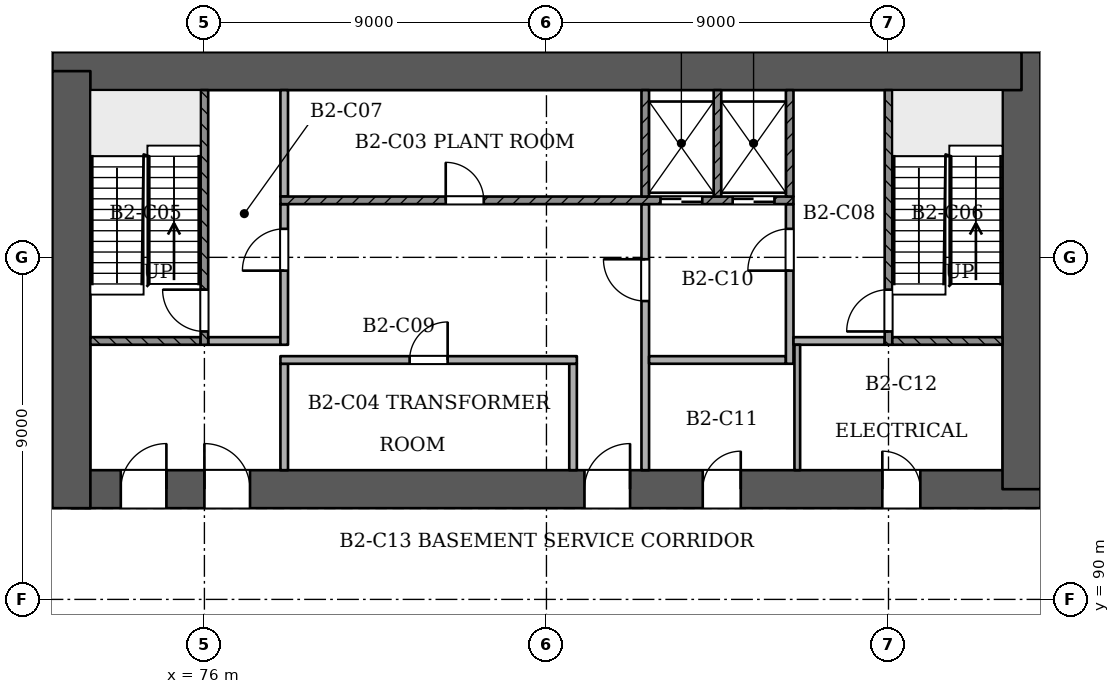
"""IFC4 building model, lengths in metres.
Left out: names, types, materials, properties, quantities, classifications, styles, units other than length and angle.
Written with IfcOpenShell. Run it as: python <this file> out.ifc"""

import sys

from ifc_helpers import new_model, si_unit, direction, frame, frame_2d, origin, place, context, subcontext, project, spatial, rectangle, extrude, element, fill, save


model = new_model("IFC4")
c1 = context("Model", 3, precision=1e-05, world=origin(), true_north=direction((0.0, 1.0)))
c2 = subcontext(c1, "Body", "Model", "MODEL_VIEW")
j1 = project(units=[si_unit("LENGTHUNIT", "METRE"), si_unit("PLANEANGLEUNIT", "RADIAN")], contexts=[c1])
p1 = place(None, origin())
s1 = spatial("IfcSite", under=j1, at=p1, CompositionType="ELEMENT")
p2 = place(p1, origin())
s2 = spatial("IfcBuilding", under=s1, at=p2, CompositionType="ELEMENT")
p3 = place(p2, frame((0.0, 0.0, -9.0)))
s3 = spatial("IfcBuildingStorey", under=s2, at=p3, CompositionType="ELEMENT", Elevation=-9.0)
p4 = place(p3, frame((48.411, 95.474, -0.3), z_axis=(0.0, 0.0, 1.0), x_axis=(0.500000424729, -0.866025158567, 0.0)))
e1 = element("IfcWall", 1, at=p4, inside=s3, PredefinedType="SOLIDWALL", context=c2, shape_type="SweptSolid", body=[
    extrude(rectangle(XDim=62.697, YDim=0.6, at=frame_2d((31.349, 0.0))), origin(), (0.0, 0.0, 1.0), 4.8),
])
p5 = place(p3, frame((90.327, 41.326, -0.3), z_axis=(0.0, 0.0, 1.0), x_axis=(0.499998738597, 0.866026132054, 0.0)))
e2 = element("IfcWall", 2, at=p5, inside=s3, PredefinedType="SOLIDWALL", context=c2, shape_type="SweptSolid", body=[
    extrude(rectangle(XDim=62.698, YDim=0.6, at=frame_2d((31.349, 0.0))), origin(), (0.0, 0.0, 1.0), 4.8),
])
p6 = place(p3, frame((72.5, 92.9, -0.3), z_axis=(0.0, 0.0, 1.0), x_axis=(1.0, 0.0, 0.0)))
e3 = element("IfcWall", 3, at=p6, inside=s3, PredefinedType="SHEAR", context=c2, shape_type="SweptSolid", body=[
    extrude(rectangle(XDim=25.5, YDim=1.0, at=frame_2d((12.75, 0.0))), origin(), (0.0, 0.0, 1.0), 4.8),
])
p7 = place(p6, frame((1.3, 0.0, 0.3)))
e4 = element("IfcOpeningElement", 4, at=p7, cuts=e3, PredefinedType="OPENING", context=c2, shape_type="SweptSolid", body=[
    extrude(rectangle(XDim=1.2, YDim=2.1, at=frame_2d((0.6, 1.05))), frame((0.0, 0.51, 0.0), z_axis=(0.0, -1.0, 0.0), x_axis=(1.0, 0.0, 0.0)), (0.0, 0.0, 1.0), 1.021),
])
p8 = place(p6, frame((3.5, 0.0, 0.3)))
e5 = element("IfcOpeningElement", 5, at=p8, cuts=e3, PredefinedType="OPENING", context=c2, shape_type="SweptSolid", body=[
    extrude(rectangle(XDim=1.2, YDim=2.1, at=frame_2d((0.6, 1.05))), frame((0.0, 0.51, 0.0), z_axis=(0.0, -1.0, 0.0), x_axis=(1.0, 0.0, 0.0)), (0.0, 0.0, 1.0), 1.021),
])
p9 = place(p6, frame((13.5, 0.0, 0.3)))
e6 = element("IfcOpeningElement", 6, at=p9, cuts=e3, PredefinedType="OPENING", context=c2, shape_type="SweptSolid", body=[
    extrude(rectangle(XDim=1.2, YDim=2.1, at=frame_2d((0.6, 1.05))), frame((0.0, 0.51, 0.0), z_axis=(0.0, -1.0, 0.0), x_axis=(1.0, 0.0, 0.0)), (0.0, 0.0, 1.0), 1.021),
])
p10 = place(p6, frame((16.613, 0.0, 0.3)))
e7 = element("IfcOpeningElement", 7, at=p10, cuts=e3, PredefinedType="OPENING", context=c2, shape_type="SweptSolid", body=[
    extrude(rectangle(XDim=1.0, YDim=2.1, at=frame_2d((0.5, 1.05))), frame((0.0, 0.51, 0.0), z_axis=(0.0, -1.0, 0.0), x_axis=(1.0, 0.0, 0.0)), (0.0, 0.0, 1.0), 1.021),
])
p11 = place(p6, frame((21.337, 0.0, 0.3)))
e8 = element("IfcOpeningElement", 8, at=p11, cuts=e3, PredefinedType="OPENING", context=c2, shape_type="SweptSolid", body=[
    extrude(rectangle(XDim=1.0, YDim=2.1, at=frame_2d((0.5, 1.05))), frame((0.0, 0.51, 0.0), z_axis=(0.0, -1.0, 0.0), x_axis=(1.0, 0.0, 0.0)), (0.0, 0.0, 1.0), 1.021),
])
p12 = place(p3, frame((97.5, 92.9, -0.3), z_axis=(0.0, 0.0, 1.0), x_axis=(0.0, 1.0, 0.0)))
e9 = element("IfcWall", 9, at=p12, inside=s3, PredefinedType="SHEAR", context=c2, shape_type="SweptSolid", body=[
    extrude(rectangle(XDim=11.5, YDim=1.0, at=frame_2d((5.75, 0.0))), origin(), (0.0, 0.0, 1.0), 4.8),
])
p13 = place(p3, frame((97.5, 103.9, -0.3), z_axis=(0.0, 0.0, 1.0), x_axis=(-1.0, 0.0, 0.0)))
e10 = element("IfcWall", 10, at=p13, inside=s3, PredefinedType="SHEAR", context=c2, shape_type="SweptSolid", body=[
    extrude(rectangle(XDim=25.5, YDim=1.0, at=frame_2d((12.75, 0.0))), origin(), (0.0, 0.0, 1.0), 4.8),
])
p14 = place(p3, frame((72.5, 103.9, -0.3), z_axis=(0.0, 0.0, 1.0), x_axis=(0.0, -1.0, 0.0)))
e11 = element("IfcWall", 11, at=p14, inside=s3, PredefinedType="SHEAR", context=c2, shape_type="SweptSolid", body=[
    extrude(rectangle(XDim=11.5, YDim=1.0, at=frame_2d((5.75, 0.0))), origin(), (0.0, 0.0, 1.0), 4.8),
])
for number, where, z_axis, x_axis in (
    (12, (78.1, 93.4, 0.0), (0.0, 0.0, 1.0), (0.0, 1.0, 0.0)),
    (13, (85.7, 93.4, 0.0), (0.0, 0.0, 1.0), (0.0, 1.0, 0.0)),
):
    element("IfcWall", number, at=place(p3, frame(where, z_axis=z_axis, x_axis=x_axis)), inside=s3, PredefinedType="PARTITIONING", context=c2, shape_type="SweptSolid", body=[
        extrude(rectangle(XDim=2.8, YDim=0.2, at=frame_2d((1.4, 0.0))), origin(), (0.0, 0.0, 1.0), 4.2),
    ])
p15 = place(p3, frame((87.6, 93.4, 0.0), z_axis=(0.0, 0.0, 1.0), x_axis=(0.0, 1.0, 0.0)))
e14 = element("IfcWall", 14, at=p15, inside=s3, PredefinedType="PARTITIONING", context=c2, shape_type="SweptSolid", body=[
    extrude(rectangle(XDim=7.0, YDim=0.2, at=frame_2d((3.5, 0.0))), origin(), (0.0, 0.0, 1.0), 4.2),
])
p16 = place(p15, frame((4.45, 0.0, 0.0)))
e15 = element("IfcOpeningElement", 15, at=p16, cuts=e14, PredefinedType="OPENING", context=c2, shape_type="SweptSolid", body=[
    extrude(rectangle(XDim=1.1, YDim=2.1, at=frame_2d((0.55, 1.05))), frame((0.0, 0.11, 0.0), z_axis=(0.0, -1.0, 0.0), x_axis=(1.0, 0.0, 0.0)), (0.0, 0.0, 1.0), 0.221),
])
p17 = place(p3, frame((91.6, 93.4, 0.0), z_axis=(0.0, 0.0, 1.0), x_axis=(0.0, 1.0, 0.0)))
e16 = element("IfcWall", 16, at=p17, inside=s3, PredefinedType="PARTITIONING", context=c2, shape_type="SweptSolid", body=[
    extrude(rectangle(XDim=3.3, YDim=0.15, at=frame_2d((1.65, 0.0))), origin(), (0.0, 0.0, 1.0), 4.2),
])
p18 = place(p3, frame((78.0, 96.3, 0.0), z_axis=(0.0, 0.0, 1.0), x_axis=(1.0, 0.0, 0.0)))
e17 = element("IfcWall", 17, at=p18, inside=s3, PredefinedType="PARTITIONING", context=c2, shape_type="SweptSolid", body=[
    extrude(rectangle(XDim=7.8, YDim=0.2, at=frame_2d((3.9, 0.0))), origin(), (0.0, 0.0, 1.0), 4.2),
])
p19 = place(p18, frame((3.4, 0.0, 0.0)))
e18 = element("IfcOpeningElement", 18, at=p19, cuts=e17, PredefinedType="OPENING", context=c2, shape_type="SweptSolid", body=[
    extrude(rectangle(XDim=1.0, YDim=2.1, at=frame_2d((0.5, 1.05))), frame((0.0, 0.11, 0.0), z_axis=(0.0, -1.0, 0.0), x_axis=(1.0, 0.0, 0.0)), (0.0, 0.0, 1.0), 0.221),
])
p20 = place(p3, frame((87.7, 96.3, 0.0), z_axis=(0.0, 0.0, 1.0), x_axis=(1.0, 0.0, 0.0)))
e19 = element("IfcWall", 19, at=p20, inside=s3, PredefinedType="PARTITIONING", context=c2, shape_type="SweptSolid", body=[
    extrude(rectangle(XDim=3.6, YDim=0.2, at=frame_2d((1.8, 0.0))), origin(), (0.0, 0.0, 1.0), 4.2),
])
p21 = place(p3, frame((91.4, 96.2, 0.0), z_axis=(0.0, 0.0, 1.0), x_axis=(0.0, 1.0, 0.0)))
e20 = element("IfcWall", 20, at=p21, inside=s3, PredefinedType="PARTITIONING", context=c2, shape_type="SweptSolid", body=[
    extrude(rectangle(XDim=4.2, YDim=0.2, at=frame_2d((2.1, 0.0))), origin(), (0.0, 0.0, 1.0), 4.2),
])
p22 = place(p21, frame((2.45, 0.0, 0.0)))
e21 = element("IfcOpeningElement", 21, at=p22, cuts=e20, PredefinedType="OPENING", context=c2, shape_type="SweptSolid", body=[
    extrude(rectangle(XDim=1.1, YDim=2.1, at=frame_2d((0.55, 1.05))), frame((0.0, 0.11, 0.0), z_axis=(0.0, -1.0, 0.0), x_axis=(1.0, 0.0, 0.0)), (0.0, 0.0, 1.0), 0.221),
])
p23 = place(p3, frame((73.0, 96.8, 0.0), z_axis=(0.0, 0.0, 1.0), x_axis=(1.0, 0.0, 0.0)))
e22 = element("IfcWall", 22, at=p23, inside=s3, PredefinedType="SOLIDWALL", context=c2, shape_type="SweptSolid", body=[
    extrude(rectangle(XDim=2.9, YDim=0.2, at=frame_2d((1.45, 0.0))), origin(), (0.0, 0.0, 1.0), 4.2),
])
p24 = place(p3, frame((76.0, 96.7, 0.0), z_axis=(0.0, 0.0, 1.0), x_axis=(0.0, 1.0, 0.0)))
e23 = element("IfcWall", 23, at=p24, inside=s3, PredefinedType="SOLIDWALL", context=c2, shape_type="SweptSolid", body=[
    extrude(rectangle(XDim=6.7, YDim=0.2, at=frame_2d((3.35, 0.0))), origin(), (0.0, 0.0, 1.0), 4.2),
])
p25 = place(p24, frame((0.35, 0.0, 0.0)))
e24 = element("IfcOpeningElement", 24, at=p25, cuts=e23, PredefinedType="OPENING", context=c2, shape_type="SweptSolid", body=[
    extrude(rectangle(XDim=1.1, YDim=2.1, at=frame_2d((0.55, 1.05))), frame((0.0, 0.11, 0.0), z_axis=(0.0, -1.0, 0.0), x_axis=(1.0, 0.0, 0.0)), (0.0, 0.0, 1.0), 0.221),
])
p26 = place(p3, frame((76.1, 96.8, 0.0), z_axis=(0.0, 0.0, 1.0), x_axis=(1.0, 0.0, 0.0)))
e25 = element("IfcWall", 25, at=p26, inside=s3, PredefinedType="PARTITIONING", context=c2, shape_type="SweptSolid", body=[
    extrude(rectangle(XDim=1.9, YDim=0.2, at=frame_2d((0.95, 0.0))), origin(), (0.0, 0.0, 1.0), 4.2),
])
p27 = place(p3, frame((78.1, 96.7, 0.0), z_axis=(0.0, 0.0, 1.0), x_axis=(0.0, 1.0, 0.0)))
e26 = element("IfcWall", 26, at=p27, inside=s3, PredefinedType="PARTITIONING", context=c2, shape_type="SweptSolid", body=[
    extrude(rectangle(XDim=3.7, YDim=0.2, at=frame_2d((1.85, 0.0))), origin(), (0.0, 0.0, 1.0), 4.2),
])
p28 = place(p27, frame((1.95, 0.0, 0.0)))
e27 = element("IfcOpeningElement", 27, at=p28, cuts=e26, PredefinedType="OPENING", context=c2, shape_type="SweptSolid", body=[
    extrude(rectangle(XDim=1.1, YDim=2.1, at=frame_2d((0.55, 1.05))), frame((0.0, 0.11, 0.0), z_axis=(0.0, -1.0, 0.0), x_axis=(1.0, 0.0, 0.0)), (0.0, 0.0, 1.0), 0.221),
])
p29 = place(p3, frame((91.5, 96.8, 0.0), z_axis=(0.0, 0.0, 1.0), x_axis=(1.0, 0.0, 0.0)))
e28 = element("IfcWall", 28, at=p29, inside=s3, PredefinedType="PARTITIONING", context=c2, shape_type="SweptSolid", body=[
    extrude(rectangle(XDim=2.4, YDim=0.2, at=frame_2d((1.2, 0.0))), origin(), (0.0, 0.0, 1.0), 4.2),
])
p30 = place(p3, frame((94.0, 96.7, 0.0), z_axis=(0.0, 0.0, 1.0), x_axis=(0.0, 1.0, 0.0)))
e29 = element("IfcWall", 29, at=p30, inside=s3, PredefinedType="SOLIDWALL", context=c2, shape_type="SweptSolid", body=[
    extrude(rectangle(XDim=6.7, YDim=0.2, at=frame_2d((3.35, 0.0))), origin(), (0.0, 0.0, 1.0), 4.2),
])
p31 = place(p30, frame((0.35, 0.0, 0.0)))
e30 = element("IfcOpeningElement", 30, at=p31, cuts=e29, PredefinedType="OPENING", context=c2, shape_type="SweptSolid", body=[
    extrude(rectangle(XDim=1.1, YDim=2.1, at=frame_2d((0.55, 1.05))), frame((0.0, 0.11, 0.0), z_axis=(0.0, -1.0, 0.0), x_axis=(1.0, 0.0, 0.0)), (0.0, 0.0, 1.0), 0.221),
])
p32 = place(p3, frame((94.1, 96.8, 0.0), z_axis=(0.0, 0.0, 1.0), x_axis=(1.0, 0.0, 0.0)))
e31 = element("IfcWall", 31, at=p32, inside=s3, PredefinedType="SOLIDWALL", context=c2, shape_type="SweptSolid", body=[
    extrude(rectangle(XDim=2.9, YDim=0.2, at=frame_2d((1.45, 0.0))), origin(), (0.0, 0.0, 1.0), 4.2),
])
p33 = place(p3, frame((78.0, 100.5, 0.0), z_axis=(0.0, 0.0, 1.0), x_axis=(1.0, 0.0, 0.0)))
e32 = element("IfcWall", 32, at=p33, inside=s3, PredefinedType="SOLIDWALL", context=c2, shape_type="SweptSolid", body=[
    extrude(rectangle(XDim=13.5, YDim=0.2, at=frame_2d((6.75, 0.0))), origin(), (0.0, 0.0, 1.0), 4.2),
])
p34 = place(p33, frame((10.0, 0.0, 0.0)))
e33 = element("IfcOpeningElement", 33, at=p34, cuts=e32, PredefinedType="OPENING", context=c2, shape_type="SweptSolid", body=[
    extrude(rectangle(XDim=1.1, YDim=2.1, at=frame_2d((0.55, 1.05))), frame((0.0, 0.11, 0.0), z_axis=(0.0, -1.0, 0.0), x_axis=(1.0, 0.0, 0.0)), (0.0, 0.0, 1.0), 0.221),
])
p35 = place(p33, frame((11.9, 0.0, 0.0)))
e34 = element("IfcOpeningElement", 34, at=p35, cuts=e32, PredefinedType="OPENING", context=c2, shape_type="SweptSolid", body=[
    extrude(rectangle(XDim=1.1, YDim=2.1, at=frame_2d((0.55, 1.05))), frame((0.0, 0.11, 0.0), z_axis=(0.0, -1.0, 0.0), x_axis=(1.0, 0.0, 0.0)), (0.0, 0.0, 1.0), 0.221),
])
p36 = place(p33, frame((4.35, 0.0, 0.0)))
e35 = element("IfcOpeningElement", 35, at=p36, cuts=e32, PredefinedType="OPENING", context=c2, shape_type="SweptSolid", body=[
    extrude(rectangle(XDim=1.0, YDim=2.1, at=frame_2d((0.5, 1.05))), frame((0.0, 0.11, 0.0), z_axis=(0.0, -1.0, 0.0), x_axis=(1.0, 0.0, 0.0)), (0.0, 0.0, 1.0), 0.221),
])
p37 = place(p3, frame((78.1, 100.6, 0.0), z_axis=(0.0, 0.0, 1.0), x_axis=(0.0, 1.0, 0.0)))
e36 = element("IfcWall", 36, at=p37, inside=s3, PredefinedType="PARTITIONING", context=c2, shape_type="SweptSolid", body=[
    extrude(rectangle(XDim=2.8, YDim=0.2, at=frame_2d((1.4, 0.0))), origin(), (0.0, 0.0, 1.0), 4.2),
])
for number, where, z_axis, x_axis in (
    (37, (87.6, 100.6, 0.0), (0.0, 0.0, 1.0), (0.0, 1.0, 0.0)),
    (38, (89.5, 100.6, 0.0), (0.0, 0.0, 1.0), (0.0, 1.0, 0.0)),
    (39, (91.4, 100.6, 0.0), (0.0, 0.0, 1.0), (0.0, 1.0, 0.0)),
):
    element("IfcWall", number, at=place(p3, frame(where, z_axis=z_axis, x_axis=x_axis)), inside=s3, PredefinedType="SOLIDWALL", context=c2, shape_type="SweptSolid", body=[
        extrude(rectangle(XDim=2.8, YDim=0.2, at=frame_2d((1.4, 0.0))), origin(), (0.0, 0.0, 1.0), 4.2),
    ])
p38 = place(p34, origin())
e40 = element("IfcDoor", 40, at=p38, inside=s3, OperationType="SLIDING_TO_RIGHT", PredefinedType="NOTDEFINED", context=c2, shape_type="SweptSolid", body=[
    extrude(rectangle(XDim=1.1, YDim=2.1, at=frame_2d((0.55, 1.05))), frame((0.0, 0.025, 0.0), z_axis=(0.0, -1.0, 0.0), x_axis=(1.0, 0.0, 0.0)), (0.0, 0.0, 1.0), 0.05),
])
fill(e33, e40)
p39 = place(p35, origin())
e41 = element("IfcDoor", 41, at=p39, inside=s3, OperationType="SLIDING_TO_LEFT", PredefinedType="NOTDEFINED", context=c2, shape_type="SweptSolid", body=[
    extrude(rectangle(XDim=1.1, YDim=2.1, at=frame_2d((0.55, 1.05))), frame((0.0, 0.025, 0.0), z_axis=(0.0, -1.0, 0.0), x_axis=(1.0, 0.0, 0.0)), (0.0, 0.0, 1.0), 0.05),
])
fill(e34, e41)
p40 = place(p25, origin())
e42 = element("IfcDoor", 42, at=p40, inside=s3, OperationType="SINGLE_SWING_RIGHT", PredefinedType="NOTDEFINED", context=c2, shape_type="SweptSolid", body=[
    extrude(rectangle(XDim=1.1, YDim=2.1, at=frame_2d((0.55, 1.05))), frame((0.0, 0.025, 0.0), z_axis=(0.0, -1.0, 0.0), x_axis=(1.0, 0.0, 0.0)), (0.0, 0.0, 1.0), 0.05),
])
fill(e24, e42)
p41 = place(p31, origin())
e43 = element("IfcDoor", 43, at=p41, inside=s3, OperationType="SINGLE_SWING_LEFT", PredefinedType="NOTDEFINED", context=c2, shape_type="SweptSolid", body=[
    extrude(rectangle(XDim=1.1, YDim=2.1, at=frame_2d((0.55, 1.05))), frame((0.0, 0.025, 0.0), z_axis=(0.0, -1.0, 0.0), x_axis=(1.0, 0.0, 0.0)), (0.0, 0.0, 1.0), 0.05),
])
fill(e30, e43)
p42 = place(p28, origin())
e44 = element("IfcDoor", 44, at=p42, inside=s3, OperationType="SINGLE_SWING_LEFT", PredefinedType="NOTDEFINED", context=c2, shape_type="SweptSolid", body=[
    extrude(rectangle(XDim=1.1, YDim=2.1, at=frame_2d((0.55, 1.05))), frame((0.0, 0.025, 0.0), z_axis=(0.0, -1.0, 0.0), x_axis=(1.0, 0.0, 0.0)), (0.0, 0.0, 1.0), 0.05),
])
fill(e27, e44)
p43 = place(p16, origin())
e45 = element("IfcDoor", 45, at=p43, inside=s3, OperationType="SINGLE_SWING_RIGHT", PredefinedType="NOTDEFINED", context=c2, shape_type="SweptSolid", body=[
    extrude(rectangle(XDim=1.1, YDim=2.1, at=frame_2d((0.55, 1.05))), frame((0.0, 0.025, 0.0), z_axis=(0.0, -1.0, 0.0), x_axis=(1.0, 0.0, 0.0)), (0.0, 0.0, 1.0), 0.05),
])
fill(e15, e45)
p44 = place(p22, origin())
e46 = element("IfcDoor", 46, at=p44, inside=s3, OperationType="SINGLE_SWING_LEFT", PredefinedType="NOTDEFINED", context=c2, shape_type="SweptSolid", body=[
    extrude(rectangle(XDim=1.1, YDim=2.1, at=frame_2d((0.55, 1.05))), frame((0.0, 0.025, 0.0), z_axis=(0.0, -1.0, 0.0), x_axis=(1.0, 0.0, 0.0)), (0.0, 0.0, 1.0), 0.05),
])
fill(e21, e46)
p45 = place(p7, origin())
e47 = element("IfcDoor", 47, at=p45, inside=s3, OperationType="SINGLE_SWING_RIGHT", PredefinedType="NOTDEFINED", context=c2, shape_type="SweptSolid", body=[
    extrude(rectangle(XDim=1.2, YDim=2.1, at=frame_2d((0.6, 1.05))), frame((0.0, 0.025, 0.0), z_axis=(0.0, -1.0, 0.0), x_axis=(1.0, 0.0, 0.0)), (0.0, 0.0, 1.0), 0.05),
])
fill(e4, e47)
p46 = place(p8, origin())
e48 = element("IfcDoor", 48, at=p46, inside=s3, OperationType="SINGLE_SWING_LEFT", PredefinedType="NOTDEFINED", context=c2, shape_type="SweptSolid", body=[
    extrude(rectangle(XDim=1.2, YDim=2.1, at=frame_2d((0.6, 1.05))), frame((0.0, 0.025, 0.0), z_axis=(0.0, -1.0, 0.0), x_axis=(1.0, 0.0, 0.0)), (0.0, 0.0, 1.0), 0.05),
])
fill(e5, e48)
p47 = place(p9, origin())
e49 = element("IfcDoor", 49, at=p47, inside=s3, OperationType="SINGLE_SWING_RIGHT", PredefinedType="NOTDEFINED", context=c2, shape_type="SweptSolid", body=[
    extrude(rectangle(XDim=1.2, YDim=2.1, at=frame_2d((0.6, 1.05))), frame((0.0, 0.025, 0.0), z_axis=(0.0, -1.0, 0.0), x_axis=(1.0, 0.0, 0.0)), (0.0, 0.0, 1.0), 0.05),
])
fill(e6, e49)
p48 = place(p10, origin())
e50 = element("IfcDoor", 50, at=p48, inside=s3, OperationType="SINGLE_SWING_RIGHT", PredefinedType="NOTDEFINED", context=c2, shape_type="SweptSolid", body=[
    extrude(rectangle(XDim=1.0, YDim=2.1, at=frame_2d((0.5, 1.05))), frame((0.0, 0.025, 0.0), z_axis=(0.0, -1.0, 0.0), x_axis=(1.0, 0.0, 0.0)), (0.0, 0.0, 1.0), 0.05),
])
fill(e7, e50)
p49 = place(p11, origin())
e51 = element("IfcDoor", 51, at=p49, inside=s3, OperationType="SINGLE_SWING_LEFT", PredefinedType="NOTDEFINED", context=c2, shape_type="SweptSolid", body=[
    extrude(rectangle(XDim=1.0, YDim=2.1, at=frame_2d((0.5, 1.05))), frame((0.0, 0.025, 0.0), z_axis=(0.0, -1.0, 0.0), x_axis=(1.0, 0.0, 0.0)), (0.0, 0.0, 1.0), 0.05),
])
fill(e8, e51)
p50 = place(p36, origin())
e52 = element("IfcDoor", 52, at=p50, inside=s3, OperationType="SINGLE_SWING_LEFT", PredefinedType="NOTDEFINED", context=c2, shape_type="SweptSolid", body=[
    extrude(rectangle(XDim=1.0, YDim=2.1, at=frame_2d((0.5, 1.05))), frame((0.0, 0.025, 0.0), z_axis=(0.0, -1.0, 0.0), x_axis=(1.0, 0.0, 0.0)), (0.0, 0.0, 1.0), 0.05),
])
fill(e35, e52)
p51 = place(p19, origin())
e53 = element("IfcDoor", 53, at=p51, inside=s3, OperationType="SINGLE_SWING_RIGHT", PredefinedType="NOTDEFINED", context=c2, shape_type="SweptSolid", body=[
    extrude(rectangle(XDim=1.0, YDim=2.1, at=frame_2d((0.5, 1.05))), frame((0.0, 0.025, 0.0), z_axis=(0.0, -1.0, 0.0), x_axis=(1.0, 0.0, 0.0)), (0.0, 0.0, 1.0), 0.05),
])
fill(e18, e53)
save(model, sys.argv[1])
